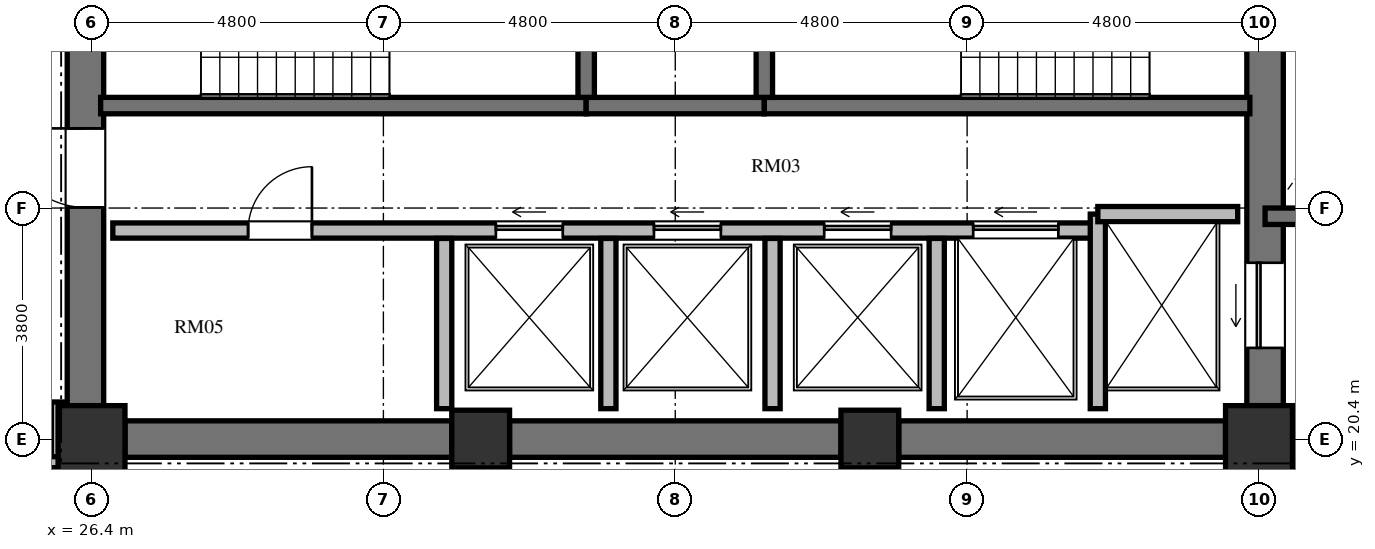
"""IFC4 building model, lengths in metres.
Left out: names, types, materials, properties, quantities, classifications, styles, units other than length and angle.
Written with IfcOpenShell. Run it as: python <this file> out.ifc"""

import sys

from ifc_helpers import new_model, si_unit, direction, frame, frame_2d, origin, origin_2d, place, context, subcontext, project, spatial, rectangle, extrude, element, fill, save


model = new_model("IFC4")
c1 = context("Model", 3, precision=1e-05, world=origin(), true_north=direction((0.0, 1.0)))
c2 = subcontext(c1, "Body", "Model", "MODEL_VIEW")
j1 = project(units=[si_unit("LENGTHUNIT", "METRE"), si_unit("PLANEANGLEUNIT", "RADIAN")], contexts=[c1])
p1 = place(None, origin())
s1 = spatial("IfcSite", under=j1, at=p1, CompositionType="ELEMENT")
p2 = place(p1, origin())
s2 = spatial("IfcBuilding", under=s1, at=p2, CompositionType="ELEMENT")
p3 = place(p2, frame((0.0, 0.0, 149.232)))
s3 = spatial("IfcBuildingStorey", under=s2, at=p3, CompositionType="ELEMENT", Elevation=149.232)
p4 = place(p3, frame((26.4, 20.4, 0.0), z_axis=(0.0, 0.0, 1.0), x_axis=(1.0, 0.0, 0.0)))
e1 = element("IfcColumn", 1, at=p4, inside=s3, PredefinedType="COLUMN", context=c2, shape_type="SweptSolid", body=[
    extrude(rectangle(XDim=1.1, YDim=1.1, at=origin_2d()), origin(), (0.0, 0.0, 1.0), 3.648),
])
for number, where, z_axis, x_axis in (
    (2, (32.8, 20.4, 0.0), (0.0, 0.0, 1.0), (1.0, 0.0, 0.0)),
    (3, (39.2, 20.4, 0.0), (0.0, 0.0, 1.0), (1.0, 0.0, 0.0)),
):
    element("IfcColumn", number, at=place(p3, frame(where, z_axis=z_axis, x_axis=x_axis)), inside=s3, PredefinedType="COLUMN", context=c2, shape_type="SweptSolid", body=[
        extrude(rectangle(XDim=0.95, YDim=0.95, at=origin_2d()), origin(), (0.0, 0.0, 1.0), 3.648),
    ])
p5 = place(p3, frame((45.6, 20.4, 0.0), z_axis=(0.0, 0.0, 1.0), x_axis=(1.0, 0.0, 0.0)))
e4 = element("IfcColumn", 4, at=p5, inside=s3, PredefinedType="COLUMN", context=c2, shape_type="SweptSolid", body=[
    extrude(rectangle(XDim=1.1, YDim=1.1, at=origin_2d()), origin(), (0.0, 0.0, 1.0), 3.648),
])
p6 = place(p3, frame((26.3, 20.95, 0.0), z_axis=(0.0, 0.0, 1.0), x_axis=(0.0, 1.0, 0.0)))
e5 = element("IfcWall", 5, at=p6, inside=s3, PredefinedType="SHEAR", context=c2, shape_type="SweptSolid", body=[
    extrude(rectangle(XDim=14.1, YDim=0.6, at=frame_2d((7.05, 0.0))), origin(), (0.0, 0.0, 1.0), 3.648),
])
p7 = place(p6, frame((6.5, 0.0, 0.0)))
e6 = element("IfcOpeningElement", 6, at=p7, cuts=e5, PredefinedType="OPENING", context=c2, shape_type="SweptSolid", body=[
    extrude(rectangle(XDim=1.2, YDim=2.15, at=frame_2d((0.6, 1.075))), frame((0.0, 0.31, 0.0), z_axis=(0.0, -1.0, 0.0), x_axis=(1.0, 0.0, 0.0)), (0.0, 0.0, 1.0), 0.62),
])
p8 = place(p6, frame((9.6, 0.0, 0.0)))
e7 = element("IfcOpeningElement", 7, at=p8, cuts=e5, PredefinedType="OPENING", context=c2, shape_type="SweptSolid", body=[
    extrude(rectangle(XDim=1.3, YDim=2.2, at=frame_2d((0.65, 1.1))), frame((0.0, 0.31, 0.0), z_axis=(0.0, -1.0, 0.0), x_axis=(1.0, 0.0, 0.0)), (0.0, 0.0, 1.0), 0.62),
])
p9 = place(p6, frame((3.26, 0.0, 0.0)))
e8 = element("IfcOpeningElement", 8, at=p9, cuts=e5, PredefinedType="OPENING", context=c2, shape_type="SweptSolid", body=[
    extrude(rectangle(XDim=1.3, YDim=2.2, at=frame_2d((0.65, 1.1))), frame((0.0, 0.31, 0.0), z_axis=(0.0, -1.0, 0.0), x_axis=(1.0, 0.0, 0.0)), (0.0, 0.0, 1.0), 0.62),
])
p10 = place(p3, frame((45.7, 20.95, 0.0), z_axis=(0.0, 0.0, 1.0), x_axis=(0.0, 1.0, 0.0)))
e9 = element("IfcWall", 9, at=p10, inside=s3, PredefinedType="SHEAR", context=c2, shape_type="SweptSolid", body=[
    extrude(rectangle(XDim=14.1, YDim=0.6, at=frame_2d((7.05, 0.0))), origin(), (0.0, 0.0, 1.0), 3.648),
])
p11 = place(p10, frame((11.75, 0.0, 0.0)))
e10 = element("IfcOpeningElement", 10, at=p11, cuts=e9, PredefinedType="OPENING", context=c2, shape_type="SweptSolid", body=[
    extrude(rectangle(XDim=1.4, YDim=2.3, at=frame_2d((0.7, 1.15))), frame((0.0, 0.31, 0.0), z_axis=(0.0, -1.0, 0.0), x_axis=(1.0, 0.0, 0.0)), (0.0, 0.0, 1.0), 0.62),
])
p12 = place(p10, frame((0.95, 0.0, 0.0)))
e11 = element("IfcOpeningElement", 11, at=p12, cuts=e9, PredefinedType="OPENING", context=c2, shape_type="SweptSolid", body=[
    extrude(rectangle(XDim=1.4, YDim=2.3, at=frame_2d((0.7, 1.15))), frame((0.0, 0.31, 0.0), z_axis=(0.0, -1.0, 0.0), x_axis=(1.0, 0.0, 0.0)), (0.0, 0.0, 1.0), 0.62),
])
p13 = place(p3, frame((26.95, 20.4, 0.0), z_axis=(0.0, 0.0, 1.0), x_axis=(1.0, 0.0, 0.0)))
e12 = element("IfcWall", 12, at=p13, inside=s3, PredefinedType="SHEAR", context=c2, shape_type="SweptSolid", body=[
    extrude(rectangle(XDim=5.375, YDim=0.6, at=frame_2d((2.688, 0.0))), origin(), (0.0, 0.0, 1.0), 3.648),
])
p14 = place(p3, frame((33.275, 20.4, 0.0), z_axis=(0.0, 0.0, 1.0), x_axis=(1.0, 0.0, 0.0)))
e13 = element("IfcWall", 13, at=p14, inside=s3, PredefinedType="SHEAR", context=c2, shape_type="SweptSolid", body=[
    extrude(rectangle(XDim=5.45, YDim=0.6, at=frame_2d((2.725, 0.0))), origin(), (0.0, 0.0, 1.0), 3.648),
])
p15 = place(p3, frame((39.675, 20.4, 0.0), z_axis=(0.0, 0.0, 1.0), x_axis=(1.0, 0.0, 0.0)))
e14 = element("IfcWall", 14, at=p15, inside=s3, PredefinedType="SHEAR", context=c2, shape_type="SweptSolid", body=[
    extrude(rectangle(XDim=5.375, YDim=0.6, at=frame_2d((2.688, 0.0))), origin(), (0.0, 0.0, 1.0), 3.648),
])
p16 = place(p3, frame((26.55, 25.885, 0.0), z_axis=(0.0, 0.0, 1.0), x_axis=(1.0, 0.0, 0.0)))
e15 = element("IfcWall", 15, at=p16, inside=s3, PredefinedType="SHEAR", context=c2, shape_type="SweptSolid", body=[
    extrude(rectangle(XDim=7.985, YDim=0.27, at=frame_2d((3.992, 0.0))), origin(), (0.0, 0.0, 1.0), 3.648),
])
p17 = place(p3, frame((34.535, 25.885, 0.0), z_axis=(0.0, 0.0, 1.0), x_axis=(1.0, 0.0, 0.0)))
e16 = element("IfcWall", 16, at=p17, inside=s3, PredefinedType="SHEAR", context=c2, shape_type="SweptSolid", body=[
    extrude(rectangle(XDim=2.93, YDim=0.27, at=frame_2d((1.465, 0.0))), origin(), (0.0, 0.0, 1.0), 3.648),
])
p18 = place(p3, frame((37.465, 25.885, 0.0), z_axis=(0.0, 0.0, 1.0), x_axis=(1.0, 0.0, 0.0)))
e17 = element("IfcWall", 17, at=p18, inside=s3, PredefinedType="SHEAR", context=c2, shape_type="SweptSolid", body=[
    extrude(rectangle(XDim=7.985, YDim=0.27, at=frame_2d((3.992, 0.0))), origin(), (0.0, 0.0, 1.0), 3.648),
])
for number, where, z_axis, x_axis in (
    (18, (34.535, 26.02, 0.0), (0.0, 0.0, 1.0), (0.0, 1.0, 0.0)),
    (19, (37.465, 26.02, 0.0), (0.0, 0.0, 1.0), (0.0, 1.0, 0.0)),
):
    element("IfcWall", number, at=place(p3, frame(where, z_axis=z_axis, x_axis=x_axis)), inside=s3, PredefinedType="SHEAR", context=c2, shape_type="SweptSolid", body=[
        extrude(rectangle(XDim=4.08, YDim=0.27, at=frame_2d((2.04, 0.0))), origin(), (0.0, 0.0, 1.0), 3.648),
    ])
p19 = place(p3, frame((26.75, 23.83, 0.0), z_axis=(0.0, 0.0, 1.0), x_axis=(1.0, 0.0, 0.0)))
e20 = element("IfcWall", 20, at=p19, inside=s3, PredefinedType="SOLIDWALL", context=c2, shape_type="SweptSolid", body=[
    extrude(rectangle(XDim=16.2, YDim=0.25, at=frame_2d((8.1, 0.0))), origin(), (0.0, 0.0, 1.0), 3.428),
])
p20 = place(p19, frame((2.225, 0.0, 0.0)))
e21 = element("IfcOpeningElement", 21, at=p20, cuts=e20, PredefinedType="OPENING", context=c2, shape_type="SweptSolid", body=[
    extrude(rectangle(XDim=1.05, YDim=2.15, at=frame_2d((0.525, 1.075))), frame((0.0, 0.135, 0.0), z_axis=(0.0, -1.0, 0.0), x_axis=(1.0, 0.0, 0.0)), (0.0, 0.0, 1.0), 0.27),
])
p21 = place(p19, frame((6.3, 0.0, 0.0)))
e22 = element("IfcOpeningElement", 22, at=p21, cuts=e20, PredefinedType="OPENING", context=c2, shape_type="SweptSolid", body=[
    extrude(rectangle(XDim=1.1, YDim=2.2, at=frame_2d((0.55, 1.1))), frame((0.0, 0.135, 0.0), z_axis=(0.0, -1.0, 0.0), x_axis=(1.0, 0.0, 0.0)), (0.0, 0.0, 1.0), 0.27),
])
p22 = place(p19, frame((8.9, 0.0, 0.0)))
e23 = element("IfcOpeningElement", 23, at=p22, cuts=e20, PredefinedType="OPENING", context=c2, shape_type="SweptSolid", body=[
    extrude(rectangle(XDim=1.1, YDim=2.2, at=frame_2d((0.55, 1.1))), frame((0.0, 0.135, 0.0), z_axis=(0.0, -1.0, 0.0), x_axis=(1.0, 0.0, 0.0)), (0.0, 0.0, 1.0), 0.27),
])
p23 = place(p19, frame((11.7, 0.0, 0.0)))
e24 = element("IfcOpeningElement", 24, at=p23, cuts=e20, PredefinedType="OPENING", context=c2, shape_type="SweptSolid", body=[
    extrude(rectangle(XDim=1.1, YDim=2.2, at=frame_2d((0.55, 1.1))), frame((0.0, 0.135, 0.0), z_axis=(0.0, -1.0, 0.0), x_axis=(1.0, 0.0, 0.0)), (0.0, 0.0, 1.0), 0.27),
])
p24 = place(p19, frame((14.15, 0.0, 0.0)))
e25 = element("IfcOpeningElement", 25, at=p24, cuts=e20, PredefinedType="OPENING", context=c2, shape_type="SweptSolid", body=[
    extrude(rectangle(XDim=1.4, YDim=2.3, at=frame_2d((0.7, 1.15))), frame((0.0, 0.135, 0.0), z_axis=(0.0, -1.0, 0.0), x_axis=(1.0, 0.0, 0.0)), (0.0, 0.0, 1.0), 0.27),
])
p25 = place(p3, frame((42.95, 20.9, 0.0), z_axis=(0.0, 0.0, 1.0), x_axis=(0.0, 1.0, 0.0)))
e26 = element("IfcWall", 26, at=p25, inside=s3, PredefinedType="SOLIDWALL", context=c2, shape_type="SweptSolid", body=[
    extrude(rectangle(XDim=3.2, YDim=0.25, at=frame_2d((1.6, 0.0))), origin(), (0.0, 0.0, 1.0), 3.428),
])
p26 = place(p3, frame((42.95, 24.1, 0.0), z_axis=(0.0, 0.0, 1.0), x_axis=(1.0, 0.0, 0.0)))
e27 = element("IfcWall", 27, at=p26, inside=s3, PredefinedType="SOLIDWALL", context=c2, shape_type="SweptSolid", body=[
    extrude(rectangle(XDim=2.3, YDim=0.25, at=frame_2d((1.15, 0.0))), origin(), (0.0, 0.0, 1.0), 3.428),
])
for number, where, z_axis, x_axis in (
    (28, (32.2, 20.9, 0.0), (0.0, 0.0, 1.0), (0.0, 1.0, 0.0)),
    (29, (34.9, 20.9, 0.0), (0.0, 0.0, 1.0), (0.0, 1.0, 0.0)),
    (30, (37.6, 20.9, 0.0), (0.0, 0.0, 1.0), (0.0, 1.0, 0.0)),
    (31, (40.3, 20.9, 0.0), (0.0, 0.0, 1.0), (0.0, 1.0, 0.0)),
):
    element("IfcWall", number, at=place(p3, frame(where, z_axis=z_axis, x_axis=x_axis)), inside=s3, PredefinedType="SOLIDWALL", context=c2, shape_type="SweptSolid", body=[
        extrude(rectangle(XDim=2.8, YDim=0.25, at=frame_2d((1.4, 0.0))), origin(), (0.0, 0.0, 1.0), 3.428),
    ])
p27 = place(p3, frame((45.7, 24.065, 0.0), z_axis=(0.0, 0.0, 1.0), x_axis=(1.0, 0.0, 0.0)))
e32 = element("IfcWall", 32, at=p27, inside=s3, PredefinedType="SHEAR", context=c2, shape_type="SweptSolid", body=[
    extrude(rectangle(XDim=4.715, YDim=0.27, at=frame_2d((2.357, 0.0))), origin(), (0.0, 0.0, 1.0), 3.648),
])
p28 = place(p3, frame((45.7, 20.02, 0.0), z_axis=(0.0, 0.0, 1.0), x_axis=(1.0, 0.0, 0.0)))
e33 = element("IfcWall", 33, at=p28, inside=s3, PredefinedType="SOLIDWALL", context=c2, shape_type="SweptSolid", body=[
    extrude(rectangle(XDim=4.715, YDim=0.25, at=frame_2d((2.357, 0.0))), origin(), (0.0, 0.0, 1.0), 3.428),
])
p29 = place(p3, frame((25.83, 21.01, 0.0), z_axis=(0.0, 0.0, 1.0), x_axis=(0.0, -1.0, 0.0)))
e34 = element("IfcWall", 34, at=p29, inside=s3, PredefinedType="PARTITIONING", context=c2, shape_type="SweptSolid", body=[
    extrude(rectangle(XDim=1.03, YDim=0.18, at=frame_2d((0.515, 0.0))), origin(), (0.0, 0.0, 1.0), 3.428),
])
p30 = place(p3, frame((25.87, 20.02, 0.0), z_axis=(0.0, 0.0, 1.0), x_axis=(-1.0, 0.0, 0.0)))
e35 = element("IfcWall", 35, at=p30, inside=s3, PredefinedType="PARTITIONING", context=c2, shape_type="SweptSolid", body=[
    extrude(rectangle(XDim=2.56, YDim=0.18, at=frame_2d((1.28, 0.0))), origin(), (0.0, 0.0, 1.0), 3.428),
])
p31 = place(p30, frame((0.858, 0.0, 0.0)))
e36 = element("IfcOpeningElement", 36, at=p31, cuts=e35, PredefinedType="OPENING", context=c2, shape_type="SweptSolid", body=[
    extrude(rectangle(XDim=1.05, YDim=2.15, at=frame_2d((0.525, 1.075))), frame((0.0, 0.1, 0.0), z_axis=(0.0, -1.0, 0.0), x_axis=(1.0, 0.0, 0.0)), (0.0, 0.0, 1.0), 0.2),
])
p32 = place(p3, frame((25.372, 19.898, 0.0), z_axis=(0.0, 0.0, 1.0), x_axis=(0.620699148788, -0.784048829279, 0.0)))
e37 = element("IfcWall", 37, at=p32, inside=s3, PredefinedType="PARTITIONING", context=c2, shape_type="SweptSolid", body=[
    extrude(rectangle(XDim=14.828, YDim=0.15, at=frame_2d((7.414, 0.0))), origin(), (0.0, 0.0, 1.0), 3.428),
])
p33 = place(p9, origin())
e38 = element("IfcDoor", 38, at=p33, inside=s3, OperationType="SINGLE_SWING_RIGHT", PredefinedType="DOOR", context=c2, shape_type="SweptSolid", body=[
    extrude(rectangle(XDim=1.3, YDim=2.2, at=frame_2d((0.65, 1.1))), frame((0.0, 0.025, 0.0), z_axis=(0.0, -1.0, 0.0), x_axis=(1.0, 0.0, 0.0)), (0.0, 0.0, 1.0), 0.05),
])
fill(e8, e38)
p34 = place(p20, origin())
e39 = element("IfcDoor", 39, at=p34, inside=s3, OperationType="SINGLE_SWING_RIGHT", PredefinedType="DOOR", context=c2, shape_type="SweptSolid", body=[
    extrude(rectangle(XDim=1.05, YDim=2.15, at=frame_2d((0.525, 1.075))), frame((0.0, 0.025, 0.0), z_axis=(0.0, -1.0, 0.0), x_axis=(1.0, 0.0, 0.0)), (0.0, 0.0, 1.0), 0.05),
])
fill(e21, e39)
p35 = place(p21, origin())
e40 = element("IfcDoor", 40, at=p35, inside=s3, OperationType="SLIDING_TO_LEFT", PredefinedType="DOOR", context=c2, shape_type="SweptSolid", body=[
    extrude(rectangle(XDim=1.1, YDim=2.2, at=frame_2d((0.55, 1.1))), frame((0.0, 0.025, 0.0), z_axis=(0.0, -1.0, 0.0), x_axis=(1.0, 0.0, 0.0)), (0.0, 0.0, 1.0), 0.05),
])
fill(e22, e40)
p36 = place(p22, origin())
e41 = element("IfcDoor", 41, at=p36, inside=s3, OperationType="SLIDING_TO_LEFT", PredefinedType="DOOR", context=c2, shape_type="SweptSolid", body=[
    extrude(rectangle(XDim=1.1, YDim=2.2, at=frame_2d((0.55, 1.1))), frame((0.0, 0.025, 0.0), z_axis=(0.0, -1.0, 0.0), x_axis=(1.0, 0.0, 0.0)), (0.0, 0.0, 1.0), 0.05),
])
fill(e23, e41)
p37 = place(p23, origin())
e42 = element("IfcDoor", 42, at=p37, inside=s3, OperationType="SLIDING_TO_LEFT", PredefinedType="DOOR", context=c2, shape_type="SweptSolid", body=[
    extrude(rectangle(XDim=1.1, YDim=2.2, at=frame_2d((0.55, 1.1))), frame((0.0, 0.025, 0.0), z_axis=(0.0, -1.0, 0.0), x_axis=(1.0, 0.0, 0.0)), (0.0, 0.0, 1.0), 0.05),
])
fill(e24, e42)
p38 = place(p12, origin())
e43 = element("IfcDoor", 43, at=p38, inside=s3, OperationType="SLIDING_TO_LEFT", PredefinedType="DOOR", context=c2, shape_type="SweptSolid", body=[
    extrude(rectangle(XDim=1.4, YDim=2.3, at=frame_2d((0.7, 1.15))), frame((0.0, 0.025, 0.0), z_axis=(0.0, -1.0, 0.0), x_axis=(1.0, 0.0, 0.0)), (0.0, 0.0, 1.0), 0.05),
])
fill(e11, e43)
p39 = place(p24, origin())
e44 = element("IfcDoor", 44, at=p39, inside=s3, OperationType="SLIDING_TO_LEFT", PredefinedType="DOOR", context=c2, shape_type="SweptSolid", body=[
    extrude(rectangle(XDim=1.4, YDim=2.3, at=frame_2d((0.7, 1.15))), frame((0.0, 0.025, 0.0), z_axis=(0.0, -1.0, 0.0), x_axis=(1.0, 0.0, 0.0)), (0.0, 0.0, 1.0), 0.05),
])
fill(e25, e44)
save(model, sys.argv[1])
